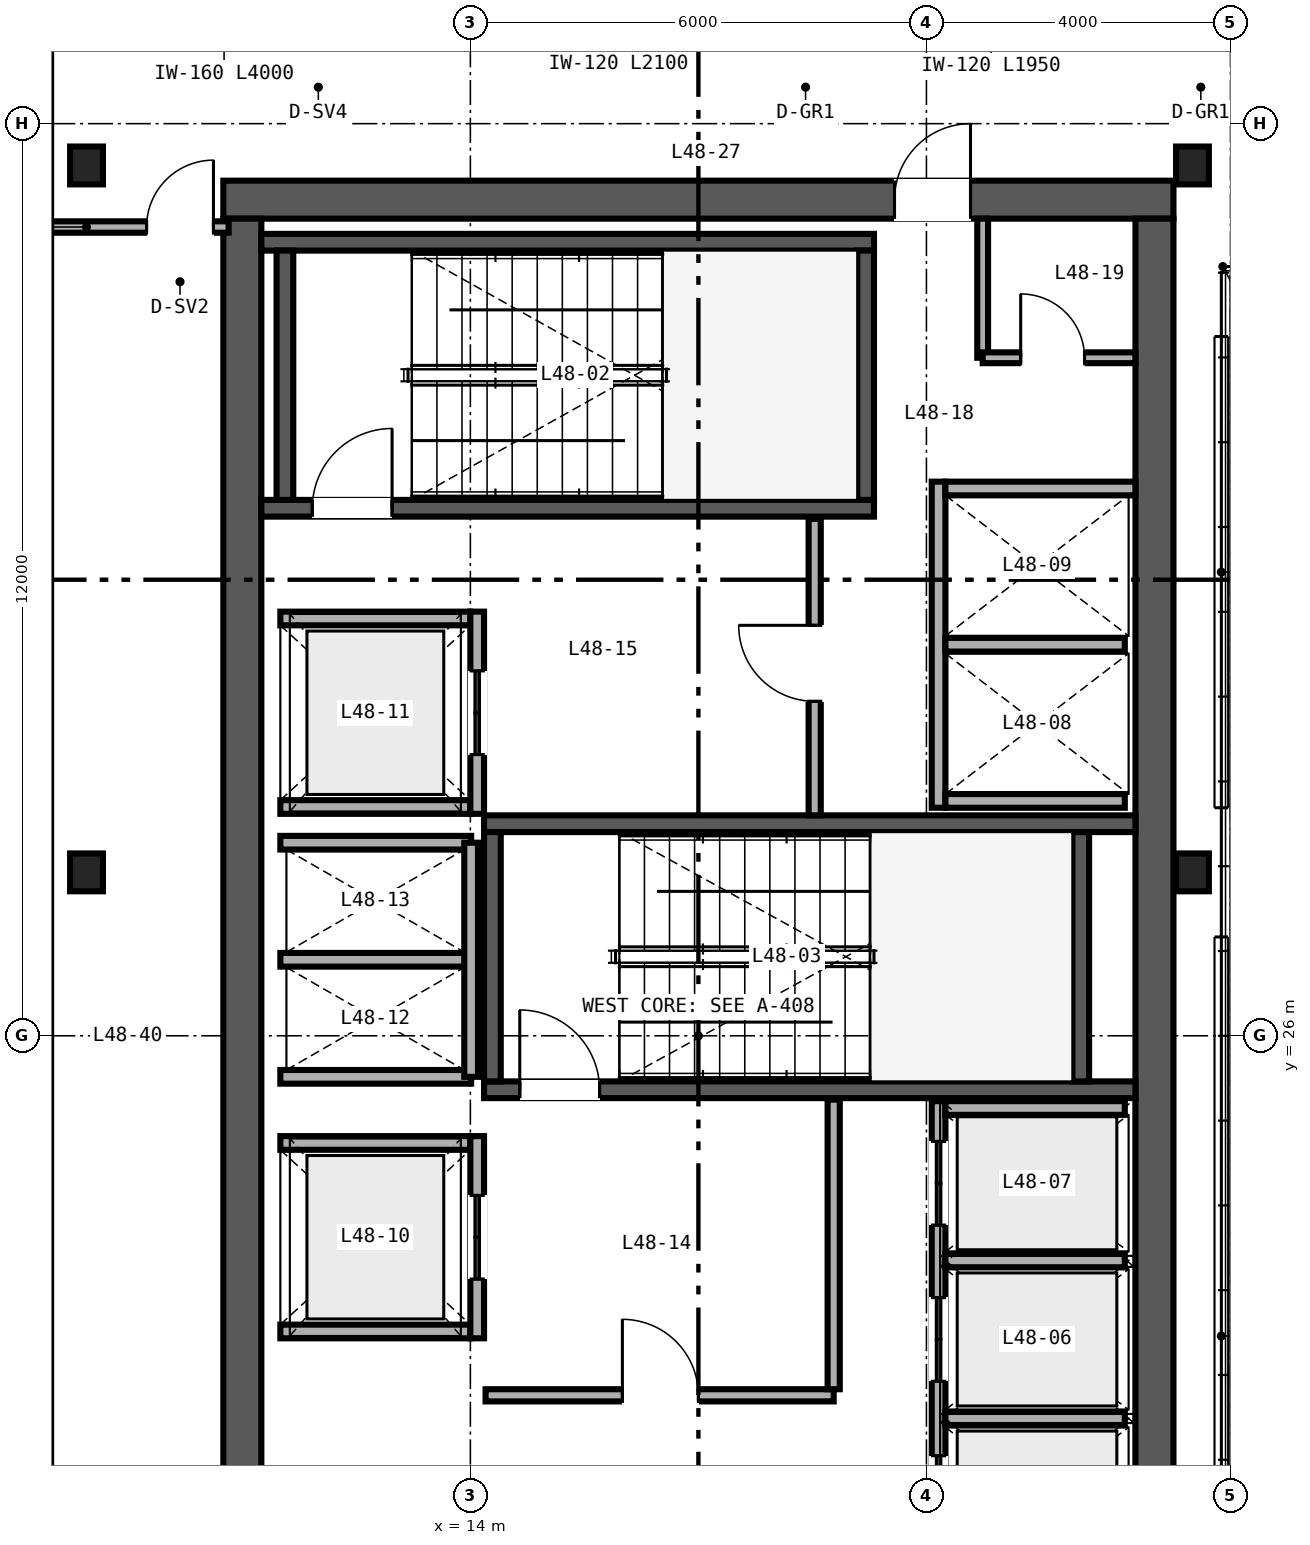
"""IFC4 building model, lengths in metres.
Left out: names, types, materials, properties, quantities, classifications, styles, units other than length and angle.
Written with IfcOpenShell. Run it as: python <this file> out.ifc"""

import sys

from ifc_helpers import new_model, si_unit, direction, frame, frame_2d, origin, origin_2d, place, context, subcontext, project, spatial, rectangle, i_section, extrude, source, transform, mapped, element, fill, save


model = new_model("IFC4")
c1 = context("Model", 3, precision=1e-05, world=origin(), true_north=direction((0.0, 1.0)))
c2 = subcontext(c1, "Body", "Model", "MODEL_VIEW")
j1 = project(units=[si_unit("LENGTHUNIT", "METRE"), si_unit("PLANEANGLEUNIT", "RADIAN")], contexts=[c1])
p1 = place(None, origin())
s1 = spatial("IfcSite", under=j1, at=p1, CompositionType="ELEMENT")
p2 = place(p1, origin())
s2 = spatial("IfcBuilding", under=s1, at=p2, CompositionType="ELEMENT")
p3 = place(p2, frame((0.0, 0.0, 192.0)))
s3 = spatial("IfcBuildingStorey", under=s2, at=p3, CompositionType="ELEMENT", Elevation=192.0)
p4 = place(p3, frame((10.75, 37.0, 0.0), z_axis=(0.0, 0.0, 1.0), x_axis=(1.0, 0.0, 0.0)))
e1 = element("IfcWall", 1, at=p4, inside=s3, PredefinedType="SHEAR", context=c2, shape_type="SweptSolid", body=[
    extrude(rectangle(XDim=12.5, YDim=0.5, at=frame_2d((6.25, 0.0))), origin(), (0.0, 0.0, 1.0), 3.37),
])
p5 = place(p4, frame((8.83, 0.0, 0.0)))
e2 = element("IfcOpeningElement", 2, at=p5, cuts=e1, PredefinedType="OPENING", context=c2, shape_type="SweptSolid", body=[
    extrude(rectangle(XDim=1.0, YDim=2.15, at=frame_2d((0.5, 1.075))), frame((0.0, 0.26, 0.0), z_axis=(0.0, -1.0, 0.0), x_axis=(1.0, 0.0, 0.0)), (0.0, 0.0, 1.0), 0.52),
])
for number, where, z_axis, x_axis in (
    (3, (11.0, 15.25, 0.0), (0.0, 0.0, 1.0), (0.0, 1.0, 0.0)),
    (4, (23.0, 15.25, 0.0), (0.0, 0.0, 1.0), (0.0, 1.0, 0.0)),
):
    element("IfcWall", number, at=place(p3, frame(where, z_axis=z_axis, x_axis=x_axis)), inside=s3, PredefinedType="SHEAR", context=c2, shape_type="SweptSolid", body=[
        extrude(rectangle(XDim=21.5, YDim=0.5, at=frame_2d((10.75, 0.0))), origin(), (0.0, 0.0, 1.0), 3.37),
    ])
p6 = place(p3, frame((11.25, 32.94, 0.0), z_axis=(0.0, 0.0, 1.0), x_axis=(1.0, 0.0, 0.0)))
e5 = element("IfcWall", 5, at=p6, inside=s3, PredefinedType="SHEAR", context=c2, shape_type="SweptSolid", body=[
    extrude(rectangle(XDim=8.06, YDim=0.22, at=frame_2d((4.03, 0.0))), origin(), (0.0, 0.0, 1.0), 3.4),
])
p7 = place(p6, frame((0.67, 0.0, 0.0)))
e6 = element("IfcOpeningElement", 6, at=p7, cuts=e5, PredefinedType="OPENING", context=c2, shape_type="SweptSolid", body=[
    extrude(rectangle(XDim=1.05, YDim=2.15, at=frame_2d((0.525, 1.075))), frame((0.0, 0.12, 0.0), z_axis=(0.0, -1.0, 0.0), x_axis=(1.0, 0.0, 0.0)), (0.0, 0.0, 1.0), 0.24),
])
p8 = place(p3, frame((11.25, 36.44, 0.0), z_axis=(0.0, 0.0, 1.0), x_axis=(1.0, 0.0, 0.0)))
e7 = element("IfcWall", 7, at=p8, inside=s3, PredefinedType="SHEAR", context=c2, shape_type="SweptSolid", body=[
    extrude(rectangle(XDim=8.06, YDim=0.22, at=frame_2d((4.03, 0.0))), origin(), (0.0, 0.0, 1.0), 3.4),
])
for number, where, z_axis, x_axis in (
    (8, (11.56, 33.05, 0.0), (0.0, 0.0, 1.0), (0.0, 1.0, 0.0)),
    (9, (19.2, 33.05, 0.0), (0.0, 0.0, 1.0), (0.0, 1.0, 0.0)),
):
    element("IfcWall", number, at=place(p3, frame(where, z_axis=z_axis, x_axis=x_axis)), inside=s3, PredefinedType="SHEAR", context=c2, shape_type="SweptSolid", body=[
        extrude(rectangle(XDim=3.28, YDim=0.22, at=frame_2d((1.64, 0.0))), origin(), (0.0, 0.0, 1.0), 3.4),
    ])
p9 = place(p3, frame((14.18, 25.29, 0.0), z_axis=(0.0, 0.0, 1.0), x_axis=(1.0, 0.0, 0.0)))
e10 = element("IfcWall", 10, at=p9, inside=s3, PredefinedType="SHEAR", context=c2, shape_type="SweptSolid", body=[
    extrude(rectangle(XDim=8.57, YDim=0.22, at=frame_2d((4.285, 0.0))), origin(), (0.0, 0.0, 1.0), 3.4),
])
p10 = place(p9, frame((0.47, 0.0, 0.0)))
e11 = element("IfcOpeningElement", 11, at=p10, cuts=e10, PredefinedType="OPENING", context=c2, shape_type="SweptSolid", body=[
    extrude(rectangle(XDim=1.05, YDim=2.15, at=frame_2d((0.525, 1.075))), frame((0.0, 0.12, 0.0), z_axis=(0.0, -1.0, 0.0), x_axis=(1.0, 0.0, 0.0)), (0.0, 0.0, 1.0), 0.24),
])
p11 = place(p3, frame((14.18, 28.79, 0.0), z_axis=(0.0, 0.0, 1.0), x_axis=(1.0, 0.0, 0.0)))
e12 = element("IfcWall", 12, at=p11, inside=s3, PredefinedType="SHEAR", context=c2, shape_type="SweptSolid", body=[
    extrude(rectangle(XDim=8.57, YDim=0.22, at=frame_2d((4.285, 0.0))), origin(), (0.0, 0.0, 1.0), 3.4),
])
for number, where, z_axis, x_axis in (
    (13, (14.29, 25.4, 0.0), (0.0, 0.0, 1.0), (0.0, 1.0, 0.0)),
    (14, (22.03, 25.4, 0.0), (0.0, 0.0, 1.0), (0.0, 1.0, 0.0)),
):
    element("IfcWall", number, at=place(p3, frame(where, z_axis=z_axis, x_axis=x_axis)), inside=s3, PredefinedType="SHEAR", context=c2, shape_type="SweptSolid", body=[
        extrude(rectangle(XDim=3.28, YDim=0.22, at=frame_2d((1.64, 0.0))), origin(), (0.0, 0.0, 1.0), 3.4),
    ])
m1 = source(origin(), c2, "Body", "SweptSolid", [
    extrude(i_section(OverallWidth=0.432, OverallDepth=0.498, WebThickness=0.056, FlangeThickness=0.089, FilletRadius=0.025, at=origin_2d()), origin(), (0.0, 0.0, 1.0), 3.37),
])
for number, where, z_axis, x_axis in (
    (15, (8.95, 28.15, 0.0), (0.0, 0.0, 1.0), (1.0, 0.0, 0.0)),
    (16, (23.5, 28.15, 0.0), (0.0, 0.0, 1.0), (1.0, 0.0, 0.0)),
    (17, (8.95, 37.45, 0.0), (0.0, 0.0, 1.0), (1.0, 0.0, 0.0)),
    (18, (23.5, 37.45, 0.0), (0.0, 0.0, 1.0), (1.0, 0.0, 0.0)),
):
    element("IfcColumn", number, at=place(p3, frame(where, z_axis=z_axis, x_axis=x_axis)), inside=s3, PredefinedType="COLUMN", context=c2, shape_type="MappedRepresentation", body=[
        mapped(m1, transform((0.0, 0.0, 0.0), scale=1.0)),
    ])
p12 = place(p3, frame((20.16, 18.82, 0.0), z_axis=(0.0, 0.0, 1.0), x_axis=(0.0, 1.0, 0.0)))
e19 = element("IfcWall", 19, at=p12, inside=s3, PredefinedType="SOLIDWALL", context=c2, shape_type="SweptSolid", body=[
    extrude(rectangle(XDim=6.32, YDim=0.18, at=frame_2d((3.16, 0.0))), origin(), (0.0, 0.0, 1.0), 2.47),
])
p13 = place(p12, frame((0.555, 0.0, 0.0)))
e20 = element("IfcOpeningElement", 20, at=p13, cuts=e19, PredefinedType="OPENING", context=c2, shape_type="SweptSolid", body=[
    extrude(rectangle(XDim=1.1, YDim=2.2, at=frame_2d((0.55, 1.1))), frame((0.0, 0.1, 0.0), z_axis=(0.0, -1.0, 0.0), x_axis=(1.0, 0.0, 0.0)), (0.0, 0.0, 1.0), 0.2),
])
p14 = place(p12, frame((2.635, 0.0, 0.0)))
e21 = element("IfcOpeningElement", 21, at=p14, cuts=e19, PredefinedType="OPENING", context=c2, shape_type="SweptSolid", body=[
    extrude(rectangle(XDim=1.1, YDim=2.2, at=frame_2d((0.55, 1.1))), frame((0.0, 0.1, 0.0), z_axis=(0.0, -1.0, 0.0), x_axis=(1.0, 0.0, 0.0)), (0.0, 0.0, 1.0), 0.2),
])
p15 = place(p12, frame((4.69, 0.0, 0.0)))
e22 = element("IfcOpeningElement", 22, at=p15, cuts=e19, PredefinedType="OPENING", context=c2, shape_type="SweptSolid", body=[
    extrude(rectangle(XDim=1.1, YDim=2.2, at=frame_2d((0.55, 1.1))), frame((0.0, 0.1, 0.0), z_axis=(0.0, -1.0, 0.0), x_axis=(1.0, 0.0, 0.0)), (0.0, 0.0, 1.0), 0.2),
])
p16 = place(p3, frame((20.25, 25.05, 0.0), z_axis=(0.0, 0.0, 1.0), x_axis=(1.0, 0.0, 0.0)))
e23 = element("IfcWall", 23, at=p16, inside=s3, PredefinedType="SOLIDWALL", context=c2, shape_type="SweptSolid", body=[
    extrude(rectangle(XDim=2.36, YDim=0.18, at=frame_2d((1.18, 0.0))), origin(), (0.0, 0.0, 1.0), 3.37),
])
p17 = place(p3, frame((20.25, 20.965, 0.0), z_axis=(0.0, 0.0, 1.0), x_axis=(1.0, 0.0, 0.0)))
e24 = element("IfcWall", 24, at=p17, inside=s3, PredefinedType="SOLIDWALL", context=c2, shape_type="SweptSolid", body=[
    extrude(rectangle(XDim=2.36, YDim=0.18, at=frame_2d((1.18, 0.0))), origin(), (0.0, 0.0, 1.0), 2.47),
])
p18 = place(p3, frame((20.25, 23.045, 0.0), z_axis=(0.0, 0.0, 1.0), x_axis=(1.0, 0.0, 0.0)))
e25 = element("IfcWall", 25, at=p18, inside=s3, PredefinedType="SOLIDWALL", context=c2, shape_type="SweptSolid", body=[
    extrude(rectangle(XDim=2.36, YDim=0.18, at=frame_2d((1.18, 0.0))), origin(), (0.0, 0.0, 1.0), 3.37),
])
p19 = place(p3, frame((20.16, 29.0, 0.0), z_axis=(0.0, 0.0, 1.0), x_axis=(0.0, 1.0, 0.0)))
e26 = element("IfcWall", 26, at=p19, inside=s3, PredefinedType="SOLIDWALL", context=c2, shape_type="SweptSolid", body=[
    extrude(rectangle(XDim=4.29, YDim=0.18, at=frame_2d((2.145, 0.0))), origin(), (0.0, 0.0, 1.0), 3.37),
])
p20 = place(p3, frame((20.25, 29.09, 0.0), z_axis=(0.0, 0.0, 1.0), x_axis=(1.0, 0.0, 0.0)))
e27 = element("IfcWall", 27, at=p20, inside=s3, PredefinedType="SOLIDWALL", context=c2, shape_type="SweptSolid", body=[
    extrude(rectangle(XDim=2.36, YDim=0.18, at=frame_2d((1.18, 0.0))), origin(), (0.0, 0.0, 1.0), 3.37),
])
p21 = place(p3, frame((20.25, 33.2, 0.0), z_axis=(0.0, 0.0, 1.0), x_axis=(1.0, 0.0, 0.0)))
e28 = element("IfcWall", 28, at=p21, inside=s3, PredefinedType="SOLIDWALL", context=c2, shape_type="SweptSolid", body=[
    extrude(rectangle(XDim=2.5, YDim=0.18, at=frame_2d((1.25, 0.0))), origin(), (0.0, 0.0, 1.0), 3.37),
])
p22 = place(p3, frame((20.25, 31.145, 0.0), z_axis=(0.0, 0.0, 1.0), x_axis=(1.0, 0.0, 0.0)))
e29 = element("IfcWall", 29, at=p22, inside=s3, PredefinedType="SOLIDWALL", context=c2, shape_type="SweptSolid", body=[
    extrude(rectangle(XDim=2.36, YDim=0.18, at=frame_2d((1.18, 0.0))), origin(), (0.0, 0.0, 1.0), 3.37),
])
for number, where, z_axis, x_axis in (
    (30, (11.5, 22.11, 0.0), (0.0, 0.0, 1.0), (1.0, 0.0, 0.0)),
    (31, (11.5, 24.59, 0.0), (0.0, 0.0, 1.0), (1.0, 0.0, 0.0)),
):
    element("IfcWall", number, at=place(p3, frame(where, z_axis=z_axis, x_axis=x_axis)), inside=s3, PredefinedType="SOLIDWALL", context=c2, shape_type="SweptSolid", body=[
        extrude(rectangle(XDim=2.5, YDim=0.18, at=frame_2d((1.25, 0.0))), origin(), (0.0, 0.0, 1.0), 3.37),
    ])
p23 = place(p3, frame((14.09, 22.02, 0.0), z_axis=(0.0, 0.0, 1.0), x_axis=(0.0, 1.0, 0.0)))
e32 = element("IfcWall", 32, at=p23, inside=s3, PredefinedType="SOLIDWALL", context=c2, shape_type="SweptSolid", body=[
    extrude(rectangle(XDim=2.66, YDim=0.18, at=frame_2d((1.33, 0.0))), origin(), (0.0, 0.0, 1.0), 3.37),
])
p24 = place(p23, frame((0.78, 0.0, 0.0)))
e33 = element("IfcOpeningElement", 33, at=p24, cuts=e32, PredefinedType="OPENING", context=c2, shape_type="SweptSolid", body=[
    extrude(rectangle(XDim=1.1, YDim=2.2, at=frame_2d((0.55, 1.1))), frame((0.0, 0.1, 0.0), z_axis=(0.0, -1.0, 0.0), x_axis=(1.0, 0.0, 0.0)), (0.0, 0.0, 1.0), 0.2),
])
for number, where, z_axis, x_axis in (
    (34, (11.5, 29.01, 0.0), (0.0, 0.0, 1.0), (1.0, 0.0, 0.0)),
    (35, (11.5, 31.49, 0.0), (0.0, 0.0, 1.0), (1.0, 0.0, 0.0)),
):
    element("IfcWall", number, at=place(p3, frame(where, z_axis=z_axis, x_axis=x_axis)), inside=s3, PredefinedType="SOLIDWALL", context=c2, shape_type="SweptSolid", body=[
        extrude(rectangle(XDim=2.5, YDim=0.18, at=frame_2d((1.25, 0.0))), origin(), (0.0, 0.0, 1.0), 3.37),
    ])
p25 = place(p3, frame((14.09, 28.92, 0.0), z_axis=(0.0, 0.0, 1.0), x_axis=(0.0, 1.0, 0.0)))
e36 = element("IfcWall", 36, at=p25, inside=s3, PredefinedType="SOLIDWALL", context=c2, shape_type="SweptSolid", body=[
    extrude(rectangle(XDim=2.66, YDim=0.18, at=frame_2d((1.33, 0.0))), origin(), (0.0, 0.0, 1.0), 3.37),
])
p26 = place(p25, frame((0.78, 0.0, 0.0)))
e37 = element("IfcOpeningElement", 37, at=p26, cuts=e36, PredefinedType="OPENING", context=c2, shape_type="SweptSolid", body=[
    extrude(rectangle(XDim=1.1, YDim=2.2, at=frame_2d((0.55, 1.1))), frame((0.0, 0.1, 0.0), z_axis=(0.0, -1.0, 0.0), x_axis=(1.0, 0.0, 0.0)), (0.0, 0.0, 1.0), 0.2),
])
for number, where, z_axis, x_axis in (
    (38, (11.5, 25.46, 0.0), (0.0, 0.0, 1.0), (1.0, 0.0, 0.0)),
    (39, (11.5, 27.0, 0.0), (0.0, 0.0, 1.0), (1.0, 0.0, 0.0)),
    (40, (11.5, 28.54, 0.0), (0.0, 0.0, 1.0), (1.0, 0.0, 0.0)),
):
    element("IfcWall", number, at=place(p3, frame(where, z_axis=z_axis, x_axis=x_axis)), inside=s3, PredefinedType="SOLIDWALL", context=c2, shape_type="SweptSolid", body=[
        extrude(rectangle(XDim=2.51, YDim=0.18, at=frame_2d((1.255, 0.0))), origin(), (0.0, 0.0, 1.0), 3.37),
    ])
p27 = place(p3, frame((14.01, 25.46, 0.0), z_axis=(0.0, 0.0, 1.0), x_axis=(0.0, 1.0, 0.0)))
e41 = element("IfcWall", 41, at=p27, inside=s3, PredefinedType="SOLIDWALL", context=c2, shape_type="SweptSolid", body=[
    extrude(rectangle(XDim=3.08, YDim=0.18, at=frame_2d((1.54, 0.0))), origin(), (0.0, 0.0, 1.0), 3.37),
])
p28 = place(p3, frame((14.2, 21.27, 0.0), z_axis=(0.0, 0.0, 1.0), x_axis=(1.0, 0.0, 0.0)))
e42 = element("IfcWall", 42, at=p28, inside=s3, PredefinedType="PARTITIONING", context=c2, shape_type="SweptSolid", body=[
    extrude(rectangle(XDim=4.58, YDim=0.16, at=frame_2d((2.29, 0.0))), origin(), (0.0, 0.0, 1.0), 3.37),
])
p29 = place(p28, frame((1.8, 0.0, 0.0)))
e43 = element("IfcOpeningElement", 43, at=p29, cuts=e42, PredefinedType="OPENING", context=c2, shape_type="SweptSolid", body=[
    extrude(rectangle(XDim=1.0, YDim=2.15, at=frame_2d((0.5, 1.075))), frame((0.0, 0.09, 0.0), z_axis=(0.0, -1.0, 0.0), x_axis=(1.0, 0.0, 0.0)), (0.0, 0.0, 1.0), 0.18),
])
p30 = place(p3, frame((18.78, 21.35, 0.0), z_axis=(0.0, 0.0, 1.0), x_axis=(0.0, 1.0, 0.0)))
e44 = element("IfcWall", 44, at=p30, inside=s3, PredefinedType="PARTITIONING", context=c2, shape_type="SweptSolid", body=[
    extrude(rectangle(XDim=3.81, YDim=0.16, at=frame_2d((1.905, 0.0))), origin(), (0.0, 0.0, 1.0), 3.37),
])
p31 = place(p3, frame((18.53, 28.9, 0.0), z_axis=(0.0, 0.0, 1.0), x_axis=(0.0, 1.0, 0.0)))
e45 = element("IfcWall", 45, at=p31, inside=s3, PredefinedType="PARTITIONING", context=c2, shape_type="SweptSolid", body=[
    extrude(rectangle(XDim=3.9, YDim=0.16, at=frame_2d((1.95, 0.0))), origin(), (0.0, 0.0, 1.0), 3.37),
])
p32 = place(p31, frame((1.5, 0.0, 0.0)))
e46 = element("IfcOpeningElement", 46, at=p32, cuts=e45, PredefinedType="OPENING", context=c2, shape_type="SweptSolid", body=[
    extrude(rectangle(XDim=1.0, YDim=2.15, at=frame_2d((0.5, 1.075))), frame((0.0, 0.09, 0.0), z_axis=(0.0, -1.0, 0.0), x_axis=(1.0, 0.0, 0.0)), (0.0, 0.0, 1.0), 0.18),
])
p33 = place(p3, frame((20.74, 34.92, 0.0), z_axis=(0.0, 0.0, 1.0), x_axis=(0.0, 1.0, 0.0)))
e47 = element("IfcWall", 47, at=p33, inside=s3, PredefinedType="PARTITIONING", context=c2, shape_type="SweptSolid", body=[
    extrude(rectangle(XDim=1.83, YDim=0.142, at=frame_2d((0.915, 0.0))), origin(), (0.0, 0.0, 1.0), 3.37),
])
p34 = place(p3, frame((20.74, 34.92, 0.0), z_axis=(0.0, 0.0, 1.0), x_axis=(1.0, 0.0, 0.0)))
e48 = element("IfcWall", 48, at=p34, inside=s3, PredefinedType="PARTITIONING", context=c2, shape_type="SweptSolid", body=[
    extrude(rectangle(XDim=2.01, YDim=0.142, at=frame_2d((1.005, 0.0))), origin(), (0.0, 0.0, 1.0), 3.37),
])
p35 = place(p34, frame((0.5, 0.0, 0.0)))
e49 = element("IfcOpeningElement", 49, at=p35, cuts=e48, PredefinedType="OPENING", context=c2, shape_type="SweptSolid", body=[
    extrude(rectangle(XDim=0.84, YDim=2.1, at=frame_2d((0.42, 1.05))), frame((0.0, 0.081, 0.0), z_axis=(0.0, -1.0, 0.0), x_axis=(1.0, 0.0, 0.0)), (0.0, 0.0, 1.0), 0.162),
])
p36 = place(p3, frame((8.16, 36.64, 0.0), z_axis=(0.0, 0.0, 1.0), x_axis=(1.0, 0.0, 0.0)))
e50 = element("IfcWall", 50, at=p36, inside=s3, PredefinedType="PARTITIONING", context=c2, shape_type="SweptSolid", body=[
    extrude(rectangle(XDim=2.66, YDim=0.15, at=frame_2d((1.33, 0.0))), origin(), (0.0, 0.0, 1.0), 2.753),
])
p37 = place(p36, frame((1.58, 0.0, 0.0)))
e51 = element("IfcOpeningElement", 51, at=p37, cuts=e50, PredefinedType="OPENING", context=c2, shape_type="SweptSolid", body=[
    extrude(rectangle(XDim=0.88, YDim=2.15, at=frame_2d((0.44, 1.075))), frame((0.0, 0.085, 0.0), z_axis=(0.0, -1.0, 0.0), x_axis=(1.0, 0.0, 0.0)), (0.0, 0.0, 1.0), 0.17),
])
m2 = source(origin(), c2, "Body", "SweptSolid", [
    extrude(rectangle(XDim=1.05, YDim=2.15, at=frame_2d((0.525, 1.075))), frame((0.0, 0.025, 0.0), z_axis=(0.0, -1.0, 0.0), x_axis=(1.0, 0.0, 0.0)), (0.0, 0.0, 1.0), 0.05),
])
p38 = place(p7, origin())
e52 = element("IfcDoor", 52, at=p38, inside=s3, OperationType="SINGLE_SWING_RIGHT", PredefinedType="DOOR", context=c2, shape_type="MappedRepresentation", body=[
    mapped(m2, transform((0.0, 0.0, 0.0), scale=1.0)),
])
fill(e6, e52)
p39 = place(p10, origin())
e53 = element("IfcDoor", 53, at=p39, inside=s3, OperationType="SINGLE_SWING_LEFT", PredefinedType="DOOR", context=c2, shape_type="MappedRepresentation", body=[
    mapped(m2, transform((0.0, 0.0, 0.0), scale=1.0)),
])
fill(e11, e53)
m3 = source(origin(), c2, "Body", "SweptSolid", [
    extrude(rectangle(XDim=1.1, YDim=2.2, at=frame_2d((0.55, 1.1))), frame((0.0, 0.025, 0.0), z_axis=(0.0, -1.0, 0.0), x_axis=(1.0, 0.0, 0.0)), (0.0, 0.0, 1.0), 0.05),
])
p40 = place(p13, origin())
e54 = element("IfcDoor", 54, at=p40, inside=s3, OperationType="DOUBLE_DOOR_SLIDING", PredefinedType="DOOR", context=c2, shape_type="MappedRepresentation", body=[
    mapped(m3, transform((0.0, 0.0, 0.0), scale=1.0)),
])
fill(e20, e54)
p41 = place(p14, origin())
e55 = element("IfcDoor", 55, at=p41, inside=s3, OperationType="DOUBLE_DOOR_SLIDING", PredefinedType="DOOR", context=c2, shape_type="MappedRepresentation", body=[
    mapped(m3, transform((0.0, 0.0, 0.0), scale=1.0)),
])
fill(e21, e55)
p42 = place(p15, origin())
e56 = element("IfcDoor", 56, at=p42, inside=s3, OperationType="DOUBLE_DOOR_SLIDING", PredefinedType="DOOR", context=c2, shape_type="MappedRepresentation", body=[
    mapped(m3, transform((0.0, 0.0, 0.0), scale=1.0)),
])
fill(e22, e56)
p43 = place(p24, origin())
e57 = element("IfcDoor", 57, at=p43, inside=s3, OperationType="DOUBLE_DOOR_SLIDING", PredefinedType="DOOR", context=c2, shape_type="MappedRepresentation", body=[
    mapped(m3, transform((0.0, 0.0, 0.0), scale=1.0)),
])
fill(e33, e57)
p44 = place(p26, origin())
e58 = element("IfcDoor", 58, at=p44, inside=s3, OperationType="DOUBLE_DOOR_SLIDING", PredefinedType="DOOR", context=c2, shape_type="MappedRepresentation", body=[
    mapped(m3, transform((0.0, 0.0, 0.0), scale=1.0)),
])
fill(e37, e58)
m4 = source(origin(), c2, "Body", "SweptSolid", [
    extrude(rectangle(XDim=1.0, YDim=2.15, at=frame_2d((0.5, 1.075))), frame((0.0, 0.025, 0.0), z_axis=(0.0, -1.0, 0.0), x_axis=(1.0, 0.0, 0.0)), (0.0, 0.0, 1.0), 0.05),
])
p45 = place(p29, origin())
e59 = element("IfcDoor", 59, at=p45, inside=s3, OperationType="SINGLE_SWING_LEFT", PredefinedType="DOOR", context=c2, shape_type="MappedRepresentation", body=[
    mapped(m4, transform((0.0, 0.0, 0.0), scale=1.0)),
])
fill(e43, e59)
p46 = place(p32, origin())
e60 = element("IfcDoor", 60, at=p46, inside=s3, OperationType="SINGLE_SWING_RIGHT", PredefinedType="DOOR", context=c2, shape_type="MappedRepresentation", body=[
    mapped(m4, transform((0.0, 0.0, 0.0), scale=1.0)),
])
fill(e46, e60)
m5 = source(origin(), c2, "Body", "SweptSolid", [
    extrude(rectangle(XDim=0.84, YDim=2.1, at=frame_2d((0.42, 1.05))), frame((0.0, 0.025, 0.0), z_axis=(0.0, -1.0, 0.0), x_axis=(1.0, 0.0, 0.0)), (0.0, 0.0, 1.0), 0.05),
])
p47 = place(p35, origin())
e61 = element("IfcDoor", 61, at=p47, inside=s3, OperationType="SINGLE_SWING_LEFT", PredefinedType="DOOR", context=c2, shape_type="MappedRepresentation", body=[
    mapped(m5, transform((0.0, 0.0, 0.0), scale=1.0)),
])
fill(e49, e61)
p48 = place(p5, origin())
e62 = element("IfcDoor", 62, at=p48, inside=s3, OperationType="SINGLE_SWING_RIGHT", PredefinedType="DOOR", context=c2, shape_type="MappedRepresentation", body=[
    mapped(m4, transform((0.0, 0.0, 0.0), scale=1.0)),
])
fill(e2, e62)
m6 = source(origin(), c2, "Body", "SweptSolid", [
    extrude(rectangle(XDim=0.88, YDim=2.15, at=frame_2d((0.44, 1.075))), frame((0.0, 0.025, 0.0), z_axis=(0.0, -1.0, 0.0), x_axis=(1.0, 0.0, 0.0)), (0.0, 0.0, 1.0), 0.05),
])
p49 = place(p37, origin())
e63 = element("IfcDoor", 63, at=p49, inside=s3, OperationType="SINGLE_SWING_RIGHT", PredefinedType="DOOR", context=c2, shape_type="MappedRepresentation", body=[
    mapped(m6, transform((0.0, 0.0, 0.0), scale=1.0)),
])
fill(e51, e63)
save(model, sys.argv[1])
